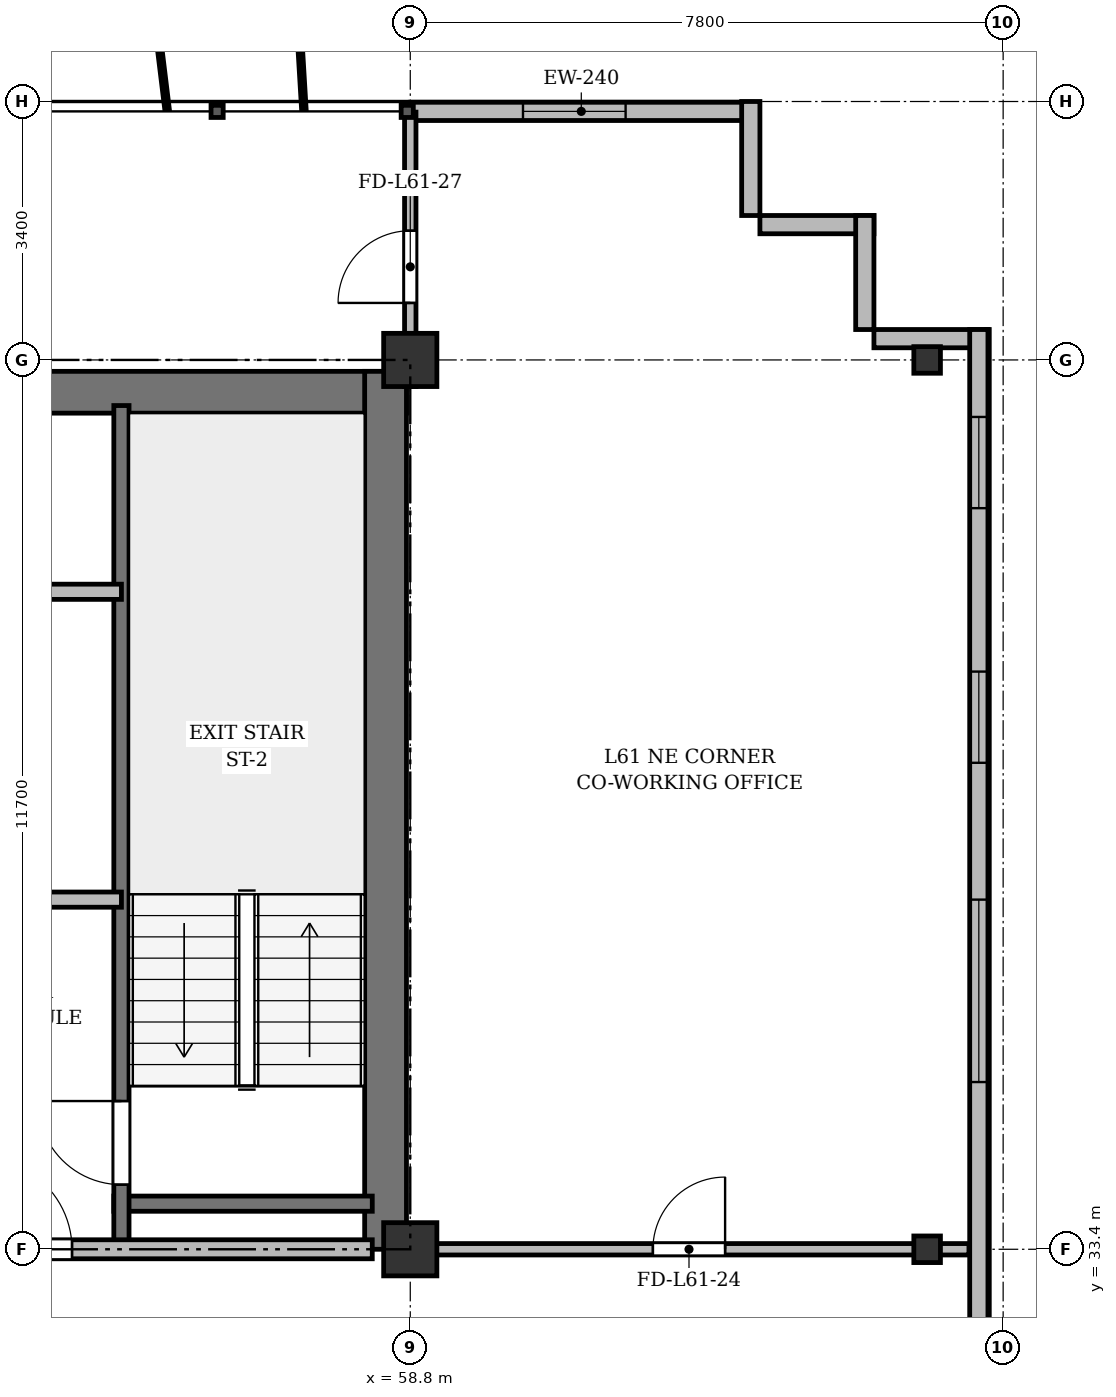
"""IFC4 building model, lengths in metres.
Left out: names, types, materials, properties, quantities, classifications, styles, units other than length and angle.
Written with IfcOpenShell. Run it as: python <this file> out.ifc"""

import sys

from ifc_helpers import new_model, si_unit, direction, frame, frame_2d, origin, origin_2d, place, context, subcontext, project, spatial, rectangle, i_section, extrude, source, transform, mapped, element, fill, save


model = new_model("IFC4")
c1 = context("Model", 3, precision=1e-05, world=origin(), true_north=direction((0.0, 1.0)))
c2 = subcontext(c1, "Body", "Model", "MODEL_VIEW")
j1 = project(units=[si_unit("LENGTHUNIT", "METRE"), si_unit("PLANEANGLEUNIT", "RADIAN")], contexts=[c1])
p1 = place(None, origin())
s1 = spatial("IfcSite", under=j1, at=p1, CompositionType="ELEMENT")
p2 = place(p1, origin())
s2 = spatial("IfcBuilding", under=s1, at=p2, CompositionType="ELEMENT")
p3 = place(p2, frame((0.0, 0.0, 233.7)))
s3 = spatial("IfcBuildingStorey", under=s2, at=p3, CompositionType="ELEMENT", Elevation=233.7)
m1 = source(origin(), c2, "Body", "SweptSolid", [
    extrude(rectangle(XDim=0.7, YDim=0.7, at=origin_2d()), origin(), (0.0, 0.0, 1.0), 3.6),
])
for number, where, z_axis, x_axis in (
    (1, (58.8, 33.4, 0.0), (0.0, 0.0, 1.0), (1.0, 0.0, 0.0)),
    (2, (58.8, 45.1, 0.0), (0.0, 0.0, 1.0), (1.0, 0.0, 0.0)),
):
    element("IfcColumn", number, at=place(p3, frame(where, z_axis=z_axis, x_axis=x_axis)), inside=s3, PredefinedType="COLUMN", context=c2, shape_type="MappedRepresentation", body=[
        mapped(m1, transform((0.0, 0.0, 0.0), x_axis=(1.0, 0.0, 0.0), y_axis=(0.0, 1.0, 0.0), z_axis=(0.0, 0.0, 1.0), scale=1.0)),
    ])
m2 = source(origin(), c2, "Body", "SweptSolid", [
    extrude(i_section(OverallWidth=0.35, OverallDepth=0.35, WebThickness=0.018, FlangeThickness=0.028, at=origin_2d()), origin(), (0.0, 0.0, 1.0), 3.6),
])
for number, where, z_axis, x_axis in (
    (3, (65.6, 33.4, 0.0), (0.0, 0.0, 1.0), (1.0, 0.0, 0.0)),
    (4, (65.6, 45.1, 0.0), (0.0, 0.0, 1.0), (1.0, 0.0, 0.0)),
):
    element("IfcColumn", number, at=place(p3, frame(where, z_axis=z_axis, x_axis=x_axis)), inside=s3, PredefinedType="COLUMN", context=c2, shape_type="MappedRepresentation", body=[
        mapped(m2, transform((0.0, 0.0, 0.0), x_axis=(1.0, 0.0, 0.0), y_axis=(0.0, 1.0, 0.0), z_axis=(0.0, 0.0, 1.0), scale=1.0)),
    ])
p4 = place(p3, frame((58.8, 48.37, 0.0), z_axis=(0.0, 0.0, 1.0), x_axis=(1.0, 0.0, 0.0)))
e5 = element("IfcWall", 5, at=p4, inside=s3, PredefinedType="SOLIDWALL", context=c2, shape_type="SweptSolid", body=[
    extrude(rectangle(XDim=4.5, YDim=0.24, at=frame_2d((2.25, 0.0))), origin(), (0.0, 0.0, 1.0), 3.36),
])
p5 = place(p4, frame((1.483, 0.0, 0.9)))
e6 = element("IfcOpeningElement", 6, at=p5, cuts=e5, PredefinedType="OPENING", context=c2, shape_type="SweptSolid", body=[
    extrude(rectangle(XDim=1.35, YDim=1.5, at=frame_2d((0.675, 0.75))), frame((0.0, 0.13, 0.0), z_axis=(0.0, -1.0, 0.0), x_axis=(1.0, 0.0, 0.0)), (0.0, 0.0, 1.0), 0.26),
])
for number, where, z_axis, x_axis in (
    (7, (63.28, 48.5, 0.0), (0.0, 0.0, 1.0), (0.0, -1.0, 0.0)),
    (8, (63.4, 46.88, 0.0), (0.0, 0.0, 1.0), (1.0, 0.0, 0.0)),
    (9, (64.78, 47.0, 0.0), (0.0, 0.0, 1.0), (0.0, -1.0, 0.0)),
    (10, (64.9, 45.38, 0.0), (0.0, 0.0, 1.0), (1.0, 0.0, 0.0)),
):
    element("IfcWall", number, at=place(p3, frame(where, z_axis=z_axis, x_axis=x_axis)), inside=s3, PredefinedType="SOLIDWALL", context=c2, shape_type="SweptSolid", body=[
        extrude(rectangle(XDim=1.5, YDim=0.24, at=frame_2d((0.75, 0.0))), origin(), (0.0, 0.0, 1.0), 3.36),
    ])
p6 = place(p3, frame((66.28, 45.5, 0.0), z_axis=(0.0, 0.0, 1.0), x_axis=(0.0, -1.0, 0.0)))
e11 = element("IfcWall", 11, at=p6, inside=s3, PredefinedType="SOLIDWALL", context=c2, shape_type="SweptSolid", body=[
    extrude(rectangle(XDim=39.1, YDim=0.24, at=frame_2d((19.55, 0.0))), origin(), (0.0, 0.0, 1.0), 3.36),
])
p7 = place(p6, frame((36.45, 0.0, 0.92)))
e12 = element("IfcOpeningElement", 12, at=p7, cuts=e11, PredefinedType="OPENING", context=c2, shape_type="SweptSolid", body=[
    extrude(rectangle(XDim=1.2, YDim=1.65, at=frame_2d((0.6, 0.825))), frame((0.0, 0.13, 0.0), z_axis=(0.0, -1.0, 0.0), x_axis=(1.0, 0.0, 0.0)), (0.0, 0.0, 1.0), 0.26),
])
p8 = place(p6, frame((32.9, 0.0, 0.92)))
e13 = element("IfcOpeningElement", 13, at=p8, cuts=e11, PredefinedType="OPENING", context=c2, shape_type="SweptSolid", body=[
    extrude(rectangle(XDim=2.4, YDim=2.1, at=frame_2d((1.2, 1.05))), frame((0.0, 0.13, 0.0), z_axis=(0.0, -1.0, 0.0), x_axis=(1.0, 0.0, 0.0)), (0.0, 0.0, 1.0), 0.26),
])
p9 = place(p6, frame((28.7, 0.0, 0.92)))
e14 = element("IfcOpeningElement", 14, at=p9, cuts=e11, PredefinedType="OPENING", context=c2, shape_type="SweptSolid", body=[
    extrude(rectangle(XDim=2.4, YDim=2.1, at=frame_2d((1.2, 1.05))), frame((0.0, 0.13, 0.0), z_axis=(0.0, -1.0, 0.0), x_axis=(1.0, 0.0, 0.0)), (0.0, 0.0, 1.0), 0.26),
])
p10 = place(p6, frame((21.5, 0.0, 0.92)))
e15 = element("IfcOpeningElement", 15, at=p10, cuts=e11, PredefinedType="OPENING", context=c2, shape_type="SweptSolid", body=[
    extrude(rectangle(XDim=2.4, YDim=2.1, at=frame_2d((1.2, 1.05))), frame((0.0, 0.13, 0.0), z_axis=(0.0, -1.0, 0.0), x_axis=(1.0, 0.0, 0.0)), (0.0, 0.0, 1.0), 0.26),
])
p11 = place(p6, frame((7.5, 0.0, 0.92)))
e16 = element("IfcOpeningElement", 16, at=p11, cuts=e11, PredefinedType="OPENING", context=c2, shape_type="SweptSolid", body=[
    extrude(rectangle(XDim=2.4, YDim=2.1, at=frame_2d((1.2, 1.05))), frame((0.0, 0.13, 0.0), z_axis=(0.0, -1.0, 0.0), x_axis=(1.0, 0.0, 0.0)), (0.0, 0.0, 1.0), 0.26),
])
p12 = place(p6, frame((4.5, 0.0, 0.92)))
e17 = element("IfcOpeningElement", 17, at=p12, cuts=e11, PredefinedType="OPENING", context=c2, shape_type="SweptSolid", body=[
    extrude(rectangle(XDim=1.2, YDim=1.65, at=frame_2d((0.6, 0.825))), frame((0.0, 0.13, 0.0), z_axis=(0.0, -1.0, 0.0), x_axis=(1.0, 0.0, 0.0)), (0.0, 0.0, 1.0), 0.26),
])
p13 = place(p6, frame((1.15, 0.0, 0.92)))
e18 = element("IfcOpeningElement", 18, at=p13, cuts=e11, PredefinedType="OPENING", context=c2, shape_type="SweptSolid", body=[
    extrude(rectangle(XDim=1.2, YDim=1.65, at=frame_2d((0.6, 0.825))), frame((0.0, 0.13, 0.0), z_axis=(0.0, -1.0, 0.0), x_axis=(1.0, 0.0, 0.0)), (0.0, 0.0, 1.0), 0.26),
])
p14 = place(p3, frame((15.65, 44.675, 0.0), z_axis=(0.0, 0.0, 1.0), x_axis=(1.0, 0.0, 0.0)))
e19 = element("IfcWall", 19, at=p14, inside=s3, PredefinedType="SHEAR", context=c2, shape_type="SweptSolid", body=[
    extrude(rectangle(XDim=43.1, YDim=0.55, at=frame_2d((21.55, 0.0))), origin(), (0.0, 0.0, 1.0), 3.36),
])
p15 = place(p3, frame((58.475, 33.4, 0.0), z_axis=(0.0, 0.0, 1.0), x_axis=(0.0, 1.0, 0.0)))
e20 = element("IfcWall", 20, at=p15, inside=s3, PredefinedType="SHEAR", context=c2, shape_type="SweptSolid", body=[
    extrude(rectangle(XDim=11.55, YDim=0.55, at=frame_2d((5.775, 0.0))), origin(), (0.0, 0.0, 1.0), 3.36),
])
p16 = place(p3, frame((54.9, 34.0, 0.0), z_axis=(0.0, 0.0, 1.0), x_axis=(1.0, 0.0, 0.0)))
e21 = element("IfcWall", 21, at=p16, inside=s3, PredefinedType="SHEAR", context=c2, shape_type="SweptSolid", body=[
    extrude(rectangle(XDim=3.4, YDim=0.2, at=frame_2d((1.7, 0.0))), origin(), (0.0, 0.0, 1.0), 3.36),
])
p17 = place(p3, frame((55.0, 33.4, 0.0), z_axis=(0.0, 0.0, 1.0), x_axis=(0.0, 1.0, 0.0)))
e22 = element("IfcWall", 22, at=p17, inside=s3, PredefinedType="SHEAR", context=c2, shape_type="SweptSolid", body=[
    extrude(rectangle(XDim=11.1, YDim=0.2, at=frame_2d((5.55, 0.0))), origin(), (0.0, 0.0, 1.0), 3.36),
])
p18 = place(p17, frame((0.85, 0.0, 0.0)))
e23 = element("IfcOpeningElement", 23, at=p18, cuts=e22, PredefinedType="OPENING", context=c2, shape_type="SweptSolid", body=[
    extrude(rectangle(XDim=1.1, YDim=2.15, at=frame_2d((0.55, 1.075))), frame((0.0, 0.11, 0.0), z_axis=(0.0, -1.0, 0.0), x_axis=(1.0, 0.0, 0.0)), (0.0, 0.0, 1.0), 0.22),
])
p19 = place(p3, frame((47.15, 42.05, 0.0), z_axis=(0.0, 0.0, 1.0), x_axis=(1.0, 0.0, 0.0)))
e24 = element("IfcWall", 24, at=p19, inside=s3, PredefinedType="SOLIDWALL", context=c2, shape_type="SweptSolid", body=[
    extrude(rectangle(XDim=7.85, YDim=0.2, at=frame_2d((3.925, 0.0))), origin(), (0.0, 0.0, 1.0), 2.86),
])
p20 = place(p19, frame((0.75, 0.0, 0.0)))
e25 = element("IfcOpeningElement", 25, at=p20, cuts=e24, PredefinedType="OPENING", context=c2, shape_type="SweptSolid", body=[
    extrude(rectangle(XDim=0.9, YDim=2.1, at=frame_2d((0.45, 1.05))), frame((0.0, 0.11, 0.0), z_axis=(0.0, -1.0, 0.0), x_axis=(1.0, 0.0, 0.0)), (0.0, 0.0, 1.0), 0.22),
])
p21 = place(p19, frame((3.85, 0.0, 0.0)))
e26 = element("IfcOpeningElement", 26, at=p21, cuts=e24, PredefinedType="OPENING", context=c2, shape_type="SweptSolid", body=[
    extrude(rectangle(XDim=0.9, YDim=2.1, at=frame_2d((0.45, 1.05))), frame((0.0, 0.11, 0.0), z_axis=(0.0, -1.0, 0.0), x_axis=(1.0, 0.0, 0.0)), (0.0, 0.0, 1.0), 0.22),
])
p22 = place(p3, frame((52.45, 38.0, 0.0), z_axis=(0.0, 0.0, 1.0), x_axis=(1.0, 0.0, 0.0)))
e27 = element("IfcWall", 27, at=p22, inside=s3, PredefinedType="PARTITIONING", context=c2, shape_type="SweptSolid", body=[
    extrude(rectangle(XDim=2.55, YDim=0.2, at=frame_2d((1.275, 0.0))), origin(), (0.0, 0.0, 1.0), 3.36),
])
p23 = place(p3, frame((47.15, 33.4, 0.0), z_axis=(0.0, 0.0, 1.0), x_axis=(1.0, 0.0, 0.0)))
e28 = element("IfcWall", 28, at=p23, inside=s3, PredefinedType="PARTITIONING", context=c2, shape_type="SweptSolid", body=[
    extrude(rectangle(XDim=11.15, YDim=0.25, at=frame_2d((5.575, 0.0))), origin(), (0.0, 0.0, 1.0), 2.91),
])
p24 = place(p23, frame((0.7, 0.0, 0.0)))
e29 = element("IfcOpeningElement", 29, at=p24, cuts=e28, PredefinedType="OPENING", context=c2, shape_type="SweptSolid", body=[
    extrude(rectangle(XDim=0.95, YDim=2.15, at=frame_2d((0.475, 1.075))), frame((0.0, 0.135, 0.0), z_axis=(0.0, -1.0, 0.0), x_axis=(1.0, 0.0, 0.0)), (0.0, 0.0, 1.0), 0.27),
])
p25 = place(p23, frame((6.0, 0.0, 0.0)))
e30 = element("IfcOpeningElement", 30, at=p25, cuts=e28, PredefinedType="OPENING", context=c2, shape_type="SweptSolid", body=[
    extrude(rectangle(XDim=1.2, YDim=2.15, at=frame_2d((0.6, 1.075))), frame((0.0, 0.135, 0.0), z_axis=(0.0, -1.0, 0.0), x_axis=(1.0, 0.0, 0.0)), (0.0, 0.0, 1.0), 0.27),
])
p26 = place(p3, frame((58.8, 33.4, 0.0), z_axis=(0.0, 0.0, 1.0), x_axis=(1.0, 0.0, 0.0)))
e31 = element("IfcWall", 31, at=p26, inside=s3, PredefinedType="PARTITIONING", context=c2, shape_type="SweptSolid", body=[
    extrude(rectangle(XDim=7.35, YDim=0.15, at=frame_2d((3.675, 0.0))), origin(), (0.0, 0.0, 1.0), 2.91),
])
p27 = place(p26, frame((3.192, 0.0, 0.0)))
e32 = element("IfcOpeningElement", 32, at=p27, cuts=e31, PredefinedType="OPENING", context=c2, shape_type="SweptSolid", body=[
    extrude(rectangle(XDim=0.95, YDim=2.15, at=frame_2d((0.475, 1.075))), frame((0.0, 0.085, 0.0), z_axis=(0.0, -1.0, 0.0), x_axis=(1.0, 0.0, 0.0)), (0.0, 0.0, 1.0), 0.17),
])
p28 = place(p3, frame((58.8, 44.75, 0.0), z_axis=(0.0, 0.0, 1.0), x_axis=(0.0, 1.0, 0.0)))
e33 = element("IfcWall", 33, at=p28, inside=s3, PredefinedType="PARTITIONING", context=c2, shape_type="SweptSolid", body=[
    extrude(rectangle(XDim=3.61, YDim=0.15, at=frame_2d((1.805, 0.0))), origin(), (0.0, 0.0, 1.0), 2.86),
])
p29 = place(p28, frame((1.1, 0.0, 0.0)))
e34 = element("IfcOpeningElement", 34, at=p29, cuts=e33, PredefinedType="OPENING", context=c2, shape_type="SweptSolid", body=[
    extrude(rectangle(XDim=0.95, YDim=2.15, at=frame_2d((0.475, 1.075))), frame((0.0, 0.085, 0.0), z_axis=(0.0, -1.0, 0.0), x_axis=(1.0, 0.0, 0.0)), (0.0, 0.0, 1.0), 0.17),
])
m3 = source(origin(), c2, "Body", "SweptSolid", [
    extrude(rectangle(XDim=1.35, YDim=1.5, at=frame_2d((0.675, 0.75))), frame((0.0, 0.03, 0.0), z_axis=(0.0, -1.0, 0.0), x_axis=(1.0, 0.0, 0.0)), (0.0, 0.0, 1.0), 0.06),
])
p30 = place(p5, origin())
e35 = element("IfcWindow", 35, at=p30, inside=s3, PartitioningType="SINGLE_PANEL", PredefinedType="WINDOW", context=c2, shape_type="MappedRepresentation", body=[
    mapped(m3, transform((0.0, 0.0, 0.0), x_axis=(1.0, 0.0, 0.0), y_axis=(0.0, 1.0, 0.0), z_axis=(0.0, 0.0, 1.0), scale=1.0)),
])
fill(e6, e35)
m4 = source(origin(), c2, "Body", "SweptSolid", [
    extrude(rectangle(XDim=2.4, YDim=2.1, at=frame_2d((1.2, 1.05))), frame((0.0, 0.03, 0.0), z_axis=(0.0, -1.0, 0.0), x_axis=(1.0, 0.0, 0.0)), (0.0, 0.0, 1.0), 0.06),
])
p31 = place(p11, origin())
e36 = element("IfcWindow", 36, at=p31, inside=s3, PartitioningType="SINGLE_PANEL", PredefinedType="WINDOW", context=c2, shape_type="MappedRepresentation", body=[
    mapped(m4, transform((0.0, 0.0, 0.0), x_axis=(1.0, 0.0, 0.0), y_axis=(0.0, 1.0, 0.0), z_axis=(0.0, 0.0, 1.0), scale=1.0)),
])
fill(e16, e36)
m5 = source(origin(), c2, "Body", "SweptSolid", [
    extrude(rectangle(XDim=1.2, YDim=1.65, at=frame_2d((0.6, 0.825))), frame((0.0, 0.03, 0.0), z_axis=(0.0, -1.0, 0.0), x_axis=(1.0, 0.0, 0.0)), (0.0, 0.0, 1.0), 0.06),
])
p32 = place(p12, origin())
e37 = element("IfcWindow", 37, at=p32, inside=s3, PartitioningType="SINGLE_PANEL", PredefinedType="WINDOW", context=c2, shape_type="MappedRepresentation", body=[
    mapped(m5, transform((0.0, 0.0, 0.0), x_axis=(1.0, 0.0, 0.0), y_axis=(0.0, 1.0, 0.0), z_axis=(0.0, 0.0, 1.0), scale=1.0)),
])
fill(e17, e37)
p33 = place(p13, origin())
e38 = element("IfcWindow", 38, at=p33, inside=s3, PartitioningType="SINGLE_PANEL", PredefinedType="WINDOW", context=c2, shape_type="MappedRepresentation", body=[
    mapped(m5, transform((0.0, 0.0, 0.0), x_axis=(1.0, 0.0, 0.0), y_axis=(0.0, 1.0, 0.0), z_axis=(0.0, 0.0, 1.0), scale=1.0)),
])
fill(e18, e38)
m6 = source(origin(), c2, "Body", "SweptSolid", [
    extrude(rectangle(XDim=1.1, YDim=2.15, at=frame_2d((0.55, 1.075))), frame((0.0, 0.025, 0.0), z_axis=(0.0, -1.0, 0.0), x_axis=(1.0, 0.0, 0.0)), (0.0, 0.0, 1.0), 0.05),
])
p34 = place(p18, origin())
e39 = element("IfcDoor", 39, at=p34, inside=s3, OperationType="SINGLE_SWING_RIGHT", PredefinedType="DOOR", context=c2, shape_type="MappedRepresentation", body=[
    mapped(m6, transform((0.0, 0.0, 0.0), x_axis=(1.0, 0.0, 0.0), y_axis=(0.0, 1.0, 0.0), z_axis=(0.0, 0.0, 1.0), scale=1.0)),
])
fill(e23, e39)
m7 = source(origin(), c2, "Body", "SweptSolid", [
    extrude(rectangle(XDim=1.2, YDim=2.15, at=frame_2d((0.6, 1.075))), frame((0.0, 0.025, 0.0), z_axis=(0.0, -1.0, 0.0), x_axis=(1.0, 0.0, 0.0)), (0.0, 0.0, 1.0), 0.05),
])
p35 = place(p25, origin())
e40 = element("IfcDoor", 40, at=p35, inside=s3, OperationType="SINGLE_SWING_LEFT", PredefinedType="DOOR", context=c2, shape_type="MappedRepresentation", body=[
    mapped(m7, transform((0.0, 0.0, 0.0), x_axis=(1.0, 0.0, 0.0), y_axis=(0.0, 1.0, 0.0), z_axis=(0.0, 0.0, 1.0), scale=1.0)),
])
fill(e30, e40)
m8 = source(origin(), c2, "Body", "SweptSolid", [
    extrude(rectangle(XDim=0.95, YDim=2.15, at=frame_2d((0.475, 1.075))), frame((0.0, 0.025, 0.0), z_axis=(0.0, -1.0, 0.0), x_axis=(1.0, 0.0, 0.0)), (0.0, 0.0, 1.0), 0.05),
])
p36 = place(p27, origin())
e41 = element("IfcDoor", 41, at=p36, inside=s3, OperationType="SINGLE_SWING_RIGHT", PredefinedType="DOOR", context=c2, shape_type="MappedRepresentation", body=[
    mapped(m8, transform((0.0, 0.0, 0.0), x_axis=(1.0, 0.0, 0.0), y_axis=(0.0, 1.0, 0.0), z_axis=(0.0, 0.0, 1.0), scale=1.0)),
])
fill(e32, e41)
p37 = place(p29, origin())
e42 = element("IfcDoor", 42, at=p37, inside=s3, OperationType="SINGLE_SWING_LEFT", PredefinedType="DOOR", context=c2, shape_type="MappedRepresentation", body=[
    mapped(m8, transform((0.0, 0.0, 0.0), x_axis=(1.0, 0.0, 0.0), y_axis=(0.0, 1.0, 0.0), z_axis=(0.0, 0.0, 1.0), scale=1.0)),
])
fill(e34, e42)
save(model, sys.argv[1])
